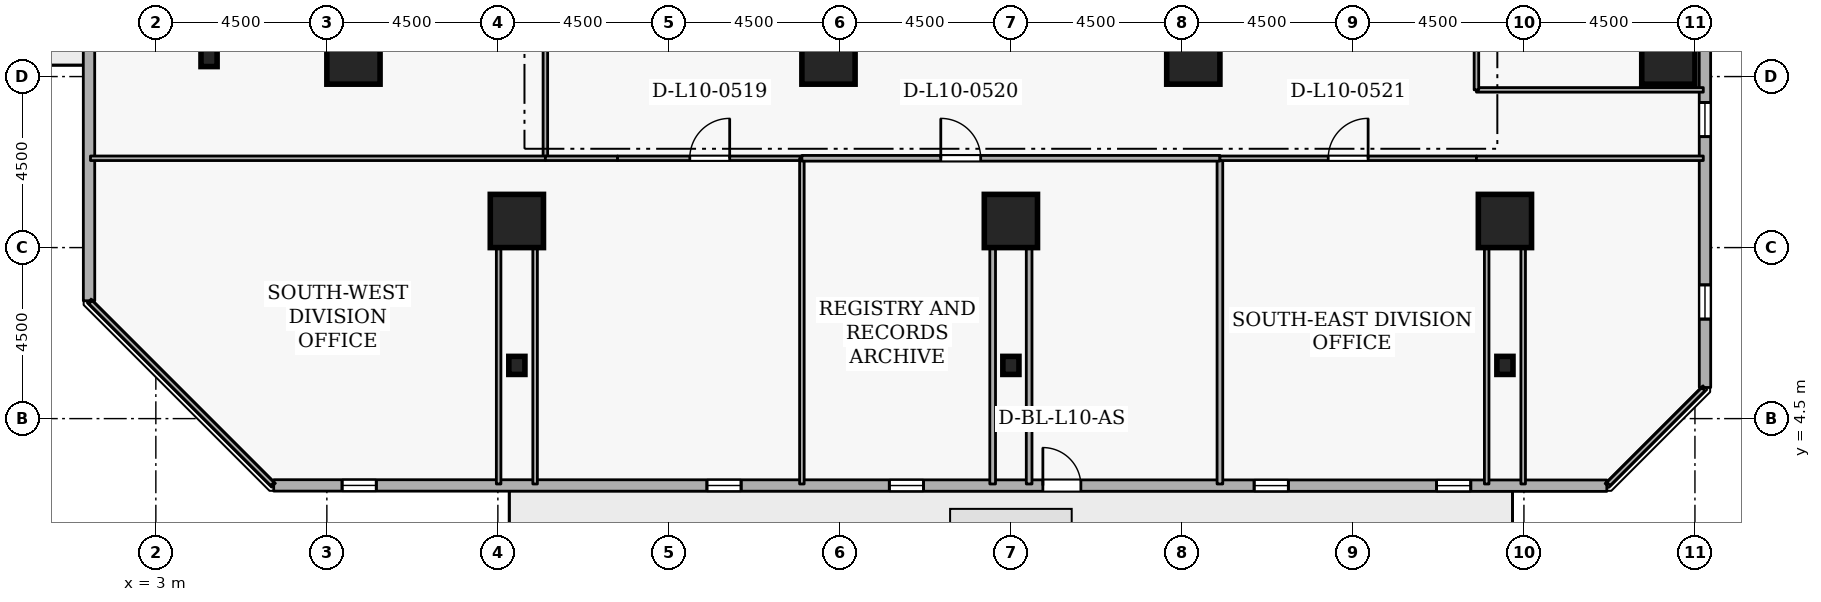
"""IFC4 building model, lengths in metres.
Left out: names, types, materials, properties, quantities, classifications, styles, units other than length and angle.
Written with IfcOpenShell. Run it as: python <this file> out.ifc"""

import sys

from ifc_helpers import new_model, si_unit, direction, frame, frame_2d, origin, origin_2d, place, context, subcontext, project, spatial, rectangle, i_section, extrude, element, fill, save


model = new_model("IFC4")
c1 = context("Model", 3, precision=1e-05, world=origin(), true_north=direction((0.0, 1.0)))
c2 = subcontext(c1, "Body", "Model", "MODEL_VIEW")
j1 = project(units=[si_unit("LENGTHUNIT", "METRE"), si_unit("PLANEANGLEUNIT", "RADIAN")], contexts=[c1])
p1 = place(None, origin())
s1 = spatial("IfcSite", under=j1, at=p1, CompositionType="ELEMENT")
p2 = place(p1, origin())
s2 = spatial("IfcBuilding", under=s1, at=p2, CompositionType="ELEMENT")
p3 = place(p2, frame((0.0, 0.0, 42.3)))
s3 = spatial("IfcBuildingStorey", under=s2, at=p3, CompositionType="ELEMENT", Elevation=42.3)
for number, where, z_axis, x_axis in (
    (1, (12.5, 9.7, 0.0), (0.0, 0.0, 1.0), (1.0, 0.0, 0.0)),
    (2, (25.5, 9.7, 0.0), (0.0, 0.0, 1.0), (1.0, 0.0, 0.0)),
    (3, (38.5, 9.7, 0.0), (0.0, 0.0, 1.0), (1.0, 0.0, 0.0)),
    (4, (42.8, 14.0, 0.0), (0.0, 0.0, 1.0), (1.0, 0.0, 0.0)),
    (5, (8.2, 14.0, 0.0), (0.0, 0.0, 1.0), (1.0, 0.0, 0.0)),
    (6, (20.7, 14.0, 0.0), (0.0, 0.0, 1.0), (1.0, 0.0, 0.0)),
    (7, (30.3, 14.0, 0.0), (0.0, 0.0, 1.0), (1.0, 0.0, 0.0)),
):
    element("IfcColumn", number, at=place(p3, frame(where, z_axis=z_axis, x_axis=x_axis)), inside=s3, PredefinedType="COLUMN", context=c2, shape_type="SweptSolid", body=[
        extrude(rectangle(XDim=1.4, YDim=1.4, at=origin_2d()), origin(), (0.0, 0.0, 1.0), 3.6),
    ])
for number, where, z_axis, x_axis in (
    (8, (12.5, 5.9, 0.0), (0.0, 0.0, 1.0), (1.0, 0.0, 0.0)),
    (9, (25.5, 5.9, 0.0), (0.0, 0.0, 1.0), (1.0, 0.0, 0.0)),
    (10, (38.5, 5.9, 0.0), (0.0, 0.0, 1.0), (1.0, 0.0, 0.0)),
    (11, (4.4, 14.0, 0.0), (0.0, 0.0, 1.0), (1.0, 0.0, 0.0)),
):
    element("IfcColumn", number, at=place(p3, frame(where, z_axis=z_axis, x_axis=x_axis)), inside=s3, PredefinedType="COLUMN", context=c2, shape_type="SweptSolid", body=[
        extrude(i_section(OverallWidth=0.424, OverallDepth=0.475, WebThickness=0.048, FlangeThickness=0.077, FilletRadius=0.015, at=origin_2d()), origin(), (0.0, 0.0, 1.0), 3.6),
    ])
p4 = place(p3, frame((6.101, 2.742, 0.0), z_axis=(0.0, 0.0, 1.0), x_axis=(0.999999978205, -0.000208784245, 0.0)))
e12 = element("IfcWall", 12, at=p4, inside=s3, PredefinedType="STANDARD", context=c2, shape_type="SweptSolid", body=[
    extrude(rectangle(XDim=35.08, YDim=0.3, at=frame_2d((17.54, 0.0))), origin(), (0.0, 0.0, 1.0), 2.7),
])
p5 = place(p4, frame((20.24, 0.0, 0.0)))
e13 = element("IfcOpeningElement", 13, at=p5, cuts=e12, PredefinedType="OPENING", context=c2, shape_type="SweptSolid", body=[
    extrude(rectangle(XDim=1.0, YDim=2.08, at=frame_2d((0.5, 1.04))), frame((0.0, 0.16, 0.0), z_axis=(0.0, -1.0, 0.0), x_axis=(1.0, 0.0, 0.0)), (0.0, 0.0, 1.0), 0.32),
])
p6 = place(p4, frame((1.8, 0.0, 0.72)))
e14 = element("IfcOpeningElement", 14, at=p6, cuts=e12, PredefinedType="OPENING", context=c2, shape_type="SweptSolid", body=[
    extrude(rectangle(XDim=0.9, YDim=1.75, at=frame_2d((0.45, 0.875))), frame((0.0, 0.16, 0.0), z_axis=(0.0, -1.0, 0.0), x_axis=(1.0, 0.0, 0.0)), (0.0, 0.0, 1.0), 0.32),
])
p7 = place(p4, frame((11.4, 0.0, 0.72)))
e15 = element("IfcOpeningElement", 15, at=p7, cuts=e12, PredefinedType="OPENING", context=c2, shape_type="SweptSolid", body=[
    extrude(rectangle(XDim=0.9, YDim=1.75, at=frame_2d((0.45, 0.875))), frame((0.0, 0.16, 0.0), z_axis=(0.0, -1.0, 0.0), x_axis=(1.0, 0.0, 0.0)), (0.0, 0.0, 1.0), 0.32),
])
p8 = place(p4, frame((16.2, 0.0, 0.72)))
e16 = element("IfcOpeningElement", 16, at=p8, cuts=e12, PredefinedType="OPENING", context=c2, shape_type="SweptSolid", body=[
    extrude(rectangle(XDim=0.9, YDim=1.75, at=frame_2d((0.45, 0.875))), frame((0.0, 0.16, 0.0), z_axis=(0.0, -1.0, 0.0), x_axis=(1.0, 0.0, 0.0)), (0.0, 0.0, 1.0), 0.32),
])
p9 = place(p4, frame((25.8, 0.0, 0.72)))
e17 = element("IfcOpeningElement", 17, at=p9, cuts=e12, PredefinedType="OPENING", context=c2, shape_type="SweptSolid", body=[
    extrude(rectangle(XDim=0.9, YDim=1.75, at=frame_2d((0.45, 0.875))), frame((0.0, 0.16, 0.0), z_axis=(0.0, -1.0, 0.0), x_axis=(1.0, 0.0, 0.0)), (0.0, 0.0, 1.0), 0.32),
])
p10 = place(p4, frame((30.6, 0.0, 0.72)))
e18 = element("IfcOpeningElement", 18, at=p10, cuts=e12, PredefinedType="OPENING", context=c2, shape_type="SweptSolid", body=[
    extrude(rectangle(XDim=0.9, YDim=1.75, at=frame_2d((0.45, 0.875))), frame((0.0, 0.16, 0.0), z_axis=(0.0, -1.0, 0.0), x_axis=(1.0, 0.0, 0.0)), (0.0, 0.0, 1.0), 0.32),
])
p11 = place(p3, frame((43.765, 5.319, 0.0), z_axis=(0.0, 0.0, 1.0), x_axis=(-0.000208784245, 0.999999978205, 0.0)))
e19 = element("IfcWall", 19, at=p11, inside=s3, PredefinedType="STANDARD", context=c2, shape_type="SweptSolid", body=[
    extrude(rectangle(XDim=35.08, YDim=0.3, at=frame_2d((17.54, 0.0))), origin(), (0.0, 0.0, 1.0), 2.7),
])
p12 = place(p11, frame((1.8, 0.0, 0.72)))
e20 = element("IfcOpeningElement", 20, at=p12, cuts=e19, PredefinedType="OPENING", context=c2, shape_type="SweptSolid", body=[
    extrude(rectangle(XDim=0.9, YDim=1.75, at=frame_2d((0.45, 0.875))), frame((0.0, 0.16, 0.0), z_axis=(0.0, -1.0, 0.0), x_axis=(1.0, 0.0, 0.0)), (0.0, 0.0, 1.0), 0.32),
])
p13 = place(p11, frame((6.6, 0.0, 0.72)))
e21 = element("IfcOpeningElement", 21, at=p13, cuts=e19, PredefinedType="OPENING", context=c2, shape_type="SweptSolid", body=[
    extrude(rectangle(XDim=0.9, YDim=1.75, at=frame_2d((0.45, 0.875))), frame((0.0, 0.16, 0.0), z_axis=(0.0, -1.0, 0.0), x_axis=(1.0, 0.0, 0.0)), (0.0, 0.0, 1.0), 0.32),
])
p14 = place(p11, frame((11.4, 0.0, 0.72)))
e22 = element("IfcOpeningElement", 22, at=p14, cuts=e19, PredefinedType="OPENING", context=c2, shape_type="SweptSolid", body=[
    extrude(rectangle(XDim=0.9, YDim=1.75, at=frame_2d((0.45, 0.875))), frame((0.0, 0.16, 0.0), z_axis=(0.0, -1.0, 0.0), x_axis=(1.0, 0.0, 0.0)), (0.0, 0.0, 1.0), 0.32),
])
p15 = place(p11, frame((16.2, 0.0, 0.72)))
e23 = element("IfcOpeningElement", 23, at=p15, cuts=e19, PredefinedType="OPENING", context=c2, shape_type="SweptSolid", body=[
    extrude(rectangle(XDim=0.9, YDim=1.75, at=frame_2d((0.45, 0.875))), frame((0.0, 0.16, 0.0), z_axis=(0.0, -1.0, 0.0), x_axis=(1.0, 0.0, 0.0)), (0.0, 0.0, 1.0), 0.32),
])
p16 = place(p11, frame((25.8, 0.0, 0.72)))
e24 = element("IfcOpeningElement", 24, at=p16, cuts=e19, PredefinedType="OPENING", context=c2, shape_type="SweptSolid", body=[
    extrude(rectangle(XDim=0.9, YDim=1.75, at=frame_2d((0.45, 0.875))), frame((0.0, 0.16, 0.0), z_axis=(0.0, -1.0, 0.0), x_axis=(1.0, 0.0, 0.0)), (0.0, 0.0, 1.0), 0.32),
])
p17 = place(p11, frame((30.6, 0.0, 0.72)))
e25 = element("IfcOpeningElement", 25, at=p17, cuts=e19, PredefinedType="OPENING", context=c2, shape_type="SweptSolid", body=[
    extrude(rectangle(XDim=0.9, YDim=1.75, at=frame_2d((0.45, 0.875))), frame((0.0, 0.16, 0.0), z_axis=(0.0, -1.0, 0.0), x_axis=(1.0, 0.0, 0.0)), (0.0, 0.0, 1.0), 0.32),
])
p18 = place(p3, frame((1.235, 42.681, 0.0), z_axis=(0.0, 0.0, 1.0), x_axis=(0.000208784245, -0.999999978205, 0.0)))
e26 = element("IfcWall", 26, at=p18, inside=s3, PredefinedType="STANDARD", context=c2, shape_type="SweptSolid", body=[
    extrude(rectangle(XDim=35.08, YDim=0.3, at=frame_2d((17.54, 0.0))), origin(), (0.0, 0.0, 1.0), 2.7),
])
p19 = place(p18, frame((19.34, 0.0, 0.0)))
e27 = element("IfcOpeningElement", 27, at=p19, cuts=e26, PredefinedType="OPENING", context=c2, shape_type="SweptSolid", body=[
    extrude(rectangle(XDim=1.0, YDim=2.08, at=frame_2d((0.5, 1.04))), frame((0.0, 0.16, 0.0), z_axis=(0.0, -1.0, 0.0), x_axis=(1.0, 0.0, 0.0)), (0.0, 0.0, 1.0), 0.32),
])
p20 = place(p18, frame((1.8, 0.0, 0.72)))
e28 = element("IfcOpeningElement", 28, at=p20, cuts=e26, PredefinedType="OPENING", context=c2, shape_type="SweptSolid", body=[
    extrude(rectangle(XDim=0.9, YDim=1.75, at=frame_2d((0.45, 0.875))), frame((0.0, 0.16, 0.0), z_axis=(0.0, -1.0, 0.0), x_axis=(1.0, 0.0, 0.0)), (0.0, 0.0, 1.0), 0.32),
])
p21 = place(p18, frame((6.6, 0.0, 0.72)))
e29 = element("IfcOpeningElement", 29, at=p21, cuts=e26, PredefinedType="OPENING", context=c2, shape_type="SweptSolid", body=[
    extrude(rectangle(XDim=0.9, YDim=1.75, at=frame_2d((0.45, 0.875))), frame((0.0, 0.16, 0.0), z_axis=(0.0, -1.0, 0.0), x_axis=(1.0, 0.0, 0.0)), (0.0, 0.0, 1.0), 0.32),
])
p22 = place(p18, frame((11.4, 0.0, 0.72)))
e30 = element("IfcOpeningElement", 30, at=p22, cuts=e26, PredefinedType="OPENING", context=c2, shape_type="SweptSolid", body=[
    extrude(rectangle(XDim=0.9, YDim=1.75, at=frame_2d((0.45, 0.875))), frame((0.0, 0.16, 0.0), z_axis=(0.0, -1.0, 0.0), x_axis=(1.0, 0.0, 0.0)), (0.0, 0.0, 1.0), 0.32),
])
p23 = place(p18, frame((16.2, 0.0, 0.72)))
e31 = element("IfcOpeningElement", 31, at=p23, cuts=e26, PredefinedType="OPENING", context=c2, shape_type="SweptSolid", body=[
    extrude(rectangle(XDim=0.9, YDim=1.75, at=frame_2d((0.45, 0.875))), frame((0.0, 0.16, 0.0), z_axis=(0.0, -1.0, 0.0), x_axis=(1.0, 0.0, 0.0)), (0.0, 0.0, 1.0), 0.32),
])
p24 = place(p18, frame((25.8, 0.0, 0.72)))
e32 = element("IfcOpeningElement", 32, at=p24, cuts=e26, PredefinedType="OPENING", context=c2, shape_type="SweptSolid", body=[
    extrude(rectangle(XDim=0.9, YDim=1.75, at=frame_2d((0.45, 0.875))), frame((0.0, 0.16, 0.0), z_axis=(0.0, -1.0, 0.0), x_axis=(1.0, 0.0, 0.0)), (0.0, 0.0, 1.0), 0.32),
])
p25 = place(p3, frame((13.25, 20.7, 0.0), z_axis=(0.0, 0.0, 1.0), x_axis=(0.0, -1.0, 0.0)))
e33 = element("IfcWall", 33, at=p25, inside=s3, PredefinedType="PARTITIONING", context=c2, shape_type="SweptSolid", body=[
    extrude(rectangle(XDim=9.35, YDim=0.12, at=frame_2d((4.675, 0.0))), origin(), (0.0, 0.0, 1.0), 3.34),
])
p26 = place(p25, frame((4.15, 0.0, 0.0)))
e34 = element("IfcOpeningElement", 34, at=p26, cuts=e33, PredefinedType="OPENING", context=c2, shape_type="SweptSolid", body=[
    extrude(rectangle(XDim=1.05, YDim=2.1, at=frame_2d((0.525, 1.05))), frame((0.0, 0.07, 0.0), z_axis=(0.0, -1.0, 0.0), x_axis=(1.0, 0.0, 0.0)), (0.0, 0.0, 1.0), 0.14),
])
p27 = place(p3, frame((13.25, 11.35, 0.0), z_axis=(0.0, 0.0, 1.0), x_axis=(-1.0, 0.0, 0.0)))
e35 = element("IfcWall", 35, at=p27, inside=s3, PredefinedType="PARTITIONING", context=c2, shape_type="SweptSolid", body=[
    extrude(rectangle(XDim=11.97, YDim=0.12, at=frame_2d((5.985, 0.0))), origin(), (0.0, 0.0, 1.0), 3.34),
])
p28 = place(p3, frame((43.72, 13.15, 0.0), z_axis=(0.0, 0.0, 1.0), x_axis=(-1.0, 0.0, 0.0)))
e36 = element("IfcWall", 36, at=p28, inside=s3, PredefinedType="PARTITIONING", context=c2, shape_type="SweptSolid", body=[
    extrude(rectangle(XDim=5.97, YDim=0.12, at=frame_2d((2.985, 0.0))), origin(), (0.0, 0.0, 1.0), 3.34),
])
p29 = place(p3, frame((37.75, 13.15, 0.0), z_axis=(0.0, 0.0, 1.0), x_axis=(0.0, 1.0, 0.0)))
e37 = element("IfcWall", 37, at=p29, inside=s3, PredefinedType="PARTITIONING", context=c2, shape_type="SweptSolid", body=[
    extrude(rectangle(XDim=1.862, YDim=0.12, at=frame_2d((0.931, 0.0))), origin(), (0.0, 0.0, 1.0), 3.34),
])
p30 = place(p3, frame((12.98, 2.78, 0.0), z_axis=(0.0, 0.0, 1.0), x_axis=(0.0, 1.0, 0.0)))
e38 = element("IfcWall", 38, at=p30, inside=s3, PredefinedType="PARTITIONING", context=c2, shape_type="SweptSolid", body=[
    extrude(rectangle(XDim=6.92, YDim=0.12, at=frame_2d((3.46, 0.0))), origin(), (0.0, 0.0, 1.0), 3.34),
])
p31 = place(p3, frame((12.02, 9.7, 0.0), z_axis=(0.0, 0.0, 1.0), x_axis=(0.0, -1.0, 0.0)))
e39 = element("IfcWall", 39, at=p31, inside=s3, PredefinedType="PARTITIONING", context=c2, shape_type="SweptSolid", body=[
    extrude(rectangle(XDim=6.92, YDim=0.12, at=frame_2d((3.46, 0.0))), origin(), (0.0, 0.0, 1.0), 2.895),
])
p32 = place(p3, frame((6.066, 2.78, 0.0), z_axis=(0.0, 0.0, 1.0), x_axis=(-0.707106781187, 0.707106781187, 0.0)))
e40 = element("IfcWall", 40, at=p32, inside=s3, PredefinedType="PARTITIONING", context=c2, shape_type="SweptSolid", body=[
    extrude(rectangle(XDim=6.768, YDim=0.12, at=frame_2d((3.384, 0.0))), origin(), (0.0, 0.0, 1.0), 3.34),
])
p33 = place(p3, frame((13.25, 11.35, 0.0), z_axis=(0.0, 0.0, 1.0), x_axis=(1.0, 0.0, 0.0)))
e41 = element("IfcWall", 41, at=p33, inside=s3, PredefinedType="PARTITIONING", context=c2, shape_type="SweptSolid", body=[
    extrude(rectangle(XDim=1.9, YDim=0.12, at=frame_2d((0.95, 0.0))), origin(), (0.0, 0.0, 1.0), 3.34),
])
p34 = place(p3, frame((15.15, 11.35, 0.0), z_axis=(0.0, 0.0, 1.0), x_axis=(1.0, 0.0, 0.0)))
e42 = element("IfcWall", 42, at=p34, inside=s3, PredefinedType="PARTITIONING", context=c2, shape_type="SweptSolid", body=[
    extrude(rectangle(XDim=4.85, YDim=0.12, at=frame_2d((2.425, 0.0))), origin(), (0.0, 0.0, 1.0), 3.34),
])
p35 = place(p34, frame((1.9, 0.0, 0.0)))
e43 = element("IfcOpeningElement", 43, at=p35, cuts=e42, PredefinedType="OPENING", context=c2, shape_type="SweptSolid", body=[
    extrude(rectangle(XDim=1.05, YDim=2.1, at=frame_2d((0.525, 1.05))), frame((0.0, 0.07, 0.0), z_axis=(0.0, -1.0, 0.0), x_axis=(1.0, 0.0, 0.0)), (0.0, 0.0, 1.0), 0.14),
])
p36 = place(p3, frame((20.0, 11.35, 0.0), z_axis=(0.0, 0.0, 1.0), x_axis=(0.0, -1.0, 0.0)))
e44 = element("IfcWall", 44, at=p36, inside=s3, PredefinedType="PARTITIONING", context=c2, shape_type="SweptSolid", body=[
    extrude(rectangle(XDim=8.57, YDim=0.12, at=frame_2d((4.285, 0.0))), origin(), (0.0, 0.0, 1.0), 3.34),
])
p37 = place(p3, frame((31.0, 11.35, 0.0), z_axis=(0.0, 0.0, 1.0), x_axis=(0.0, -1.0, 0.0)))
e45 = element("IfcWall", 45, at=p37, inside=s3, PredefinedType="PARTITIONING", context=c2, shape_type="SweptSolid", body=[
    extrude(rectangle(XDim=8.57, YDim=0.15, at=frame_2d((4.285, 0.0))), origin(), (0.0, 0.0, 1.0), 3.34),
])
for number, where, z_axis, x_axis in (
    (46, (25.98, 2.78, 0.0), (0.0, 0.0, 1.0), (0.0, 1.0, 0.0)),
    (47, (25.02, 9.7, 0.0), (0.0, 0.0, 1.0), (0.0, -1.0, 0.0)),
):
    element("IfcWall", number, at=place(p3, frame(where, z_axis=z_axis, x_axis=x_axis)), inside=s3, PredefinedType="PARTITIONING", context=c2, shape_type="SweptSolid", body=[
        extrude(rectangle(XDim=6.92, YDim=0.15, at=frame_2d((3.46, 0.0))), origin(), (0.0, 0.0, 1.0), 3.34),
    ])
p38 = place(p3, frame((20.0, 11.35, 0.0), z_axis=(0.0, 0.0, 1.0), x_axis=(1.0, 0.0, 0.0)))
e48 = element("IfcWall", 48, at=p38, inside=s3, PredefinedType="PARTITIONING", context=c2, shape_type="SweptSolid", body=[
    extrude(rectangle(XDim=11.0, YDim=0.15, at=frame_2d((5.5, 0.0))), origin(), (0.0, 0.0, 1.0), 3.34),
])
p39 = place(p38, frame((3.655, 0.0, 0.0)))
e49 = element("IfcOpeningElement", 49, at=p39, cuts=e48, PredefinedType="OPENING", context=c2, shape_type="SweptSolid", body=[
    extrude(rectangle(XDim=1.05, YDim=2.1, at=frame_2d((0.525, 1.05))), frame((0.0, 0.085, 0.0), z_axis=(0.0, -1.0, 0.0), x_axis=(1.0, 0.0, 0.0)), (0.0, 0.0, 1.0), 0.17),
])
for number, where, z_axis, x_axis in (
    (50, (38.98, 2.78, 0.0), (0.0, 0.0, 1.0), (0.0, 1.0, 0.0)),
    (51, (38.02, 9.7, 0.0), (0.0, 0.0, 1.0), (0.0, -1.0, 0.0)),
):
    element("IfcWall", number, at=place(p3, frame(where, z_axis=z_axis, x_axis=x_axis)), inside=s3, PredefinedType="PARTITIONING", context=c2, shape_type="SweptSolid", body=[
        extrude(rectangle(XDim=6.92, YDim=0.12, at=frame_2d((3.46, 0.0))), origin(), (0.0, 0.0, 1.0), 3.34),
    ])
p40 = place(p3, frame((31.0, 11.35, 0.0), z_axis=(0.0, 0.0, 1.0), x_axis=(1.0, 0.0, 0.0)))
e52 = element("IfcWall", 52, at=p40, inside=s3, PredefinedType="PARTITIONING", context=c2, shape_type="SweptSolid", body=[
    extrude(rectangle(XDim=6.75, YDim=0.12, at=frame_2d((3.375, 0.0))), origin(), (0.0, 0.0, 1.0), 3.34),
])
p41 = place(p40, frame((2.85, 0.0, 0.0)))
e53 = element("IfcOpeningElement", 53, at=p41, cuts=e52, PredefinedType="OPENING", context=c2, shape_type="SweptSolid", body=[
    extrude(rectangle(XDim=1.05, YDim=2.1, at=frame_2d((0.525, 1.05))), frame((0.0, 0.07, 0.0), z_axis=(0.0, -1.0, 0.0), x_axis=(1.0, 0.0, 0.0)), (0.0, 0.0, 1.0), 0.14),
])
p42 = place(p3, frame((37.75, 11.35, 0.0), z_axis=(0.0, 0.0, 1.0), x_axis=(1.0, 0.0, 0.0)))
e54 = element("IfcWall", 54, at=p42, inside=s3, PredefinedType="PARTITIONING", context=c2, shape_type="SweptSolid", body=[
    extrude(rectangle(XDim=5.97, YDim=0.12, at=frame_2d((2.985, 0.0))), origin(), (0.0, 0.0, 1.0), 3.34),
])
p43 = place(p3, frame((43.72, 5.275, 0.0), z_axis=(0.0, 0.0, 1.0), x_axis=(-0.707106781187, -0.707106781187, 0.0)))
e55 = element("IfcWall", 55, at=p43, inside=s3, PredefinedType="PARTITIONING", context=c2, shape_type="SweptSolid", body=[
    extrude(rectangle(XDim=3.528, YDim=0.12, at=frame_2d((1.764, 0.0))), origin(), (0.0, 0.0, 1.0), 3.34),
])
p44 = place(p5, origin())
e56 = element("IfcDoor", 56, at=p44, inside=s3, OperationType="SINGLE_SWING_LEFT", PredefinedType="DOOR", context=c2, shape_type="SweptSolid", body=[
    extrude(rectangle(XDim=1.0, YDim=2.08, at=frame_2d((0.5, 1.04))), frame((0.0, 0.025, 0.0), z_axis=(0.0, -1.0, 0.0), x_axis=(1.0, 0.0, 0.0)), (0.0, 0.0, 1.0), 0.05),
])
fill(e13, e56)
p45 = place(p6, origin())
e57 = element("IfcWindow", 57, at=p45, inside=s3, PartitioningType="SINGLE_PANEL", PredefinedType="WINDOW", context=c2, shape_type="SweptSolid", body=[
    extrude(rectangle(XDim=0.9, YDim=1.75, at=frame_2d((0.45, 0.875))), frame((0.0, 0.03, 0.0), z_axis=(0.0, -1.0, 0.0), x_axis=(1.0, 0.0, 0.0)), (0.0, 0.0, 1.0), 0.06),
])
fill(e14, e57)
p46 = place(p7, origin())
e58 = element("IfcWindow", 58, at=p46, inside=s3, PartitioningType="SINGLE_PANEL", PredefinedType="WINDOW", context=c2, shape_type="SweptSolid", body=[
    extrude(rectangle(XDim=0.9, YDim=1.75, at=frame_2d((0.45, 0.875))), frame((0.0, 0.03, 0.0), z_axis=(0.0, -1.0, 0.0), x_axis=(1.0, 0.0, 0.0)), (0.0, 0.0, 1.0), 0.06),
])
fill(e15, e58)
p47 = place(p8, origin())
e59 = element("IfcWindow", 59, at=p47, inside=s3, PartitioningType="SINGLE_PANEL", PredefinedType="WINDOW", context=c2, shape_type="SweptSolid", body=[
    extrude(rectangle(XDim=0.9, YDim=1.75, at=frame_2d((0.45, 0.875))), frame((0.0, 0.03, 0.0), z_axis=(0.0, -1.0, 0.0), x_axis=(1.0, 0.0, 0.0)), (0.0, 0.0, 1.0), 0.06),
])
fill(e16, e59)
p48 = place(p9, origin())
e60 = element("IfcWindow", 60, at=p48, inside=s3, PartitioningType="SINGLE_PANEL", PredefinedType="WINDOW", context=c2, shape_type="SweptSolid", body=[
    extrude(rectangle(XDim=0.9, YDim=1.75, at=frame_2d((0.45, 0.875))), frame((0.0, 0.03, 0.0), z_axis=(0.0, -1.0, 0.0), x_axis=(1.0, 0.0, 0.0)), (0.0, 0.0, 1.0), 0.06),
])
fill(e17, e60)
p49 = place(p10, origin())
e61 = element("IfcWindow", 61, at=p49, inside=s3, PartitioningType="SINGLE_PANEL", PredefinedType="WINDOW", context=c2, shape_type="SweptSolid", body=[
    extrude(rectangle(XDim=0.9, YDim=1.75, at=frame_2d((0.45, 0.875))), frame((0.0, 0.03, 0.0), z_axis=(0.0, -1.0, 0.0), x_axis=(1.0, 0.0, 0.0)), (0.0, 0.0, 1.0), 0.06),
])
fill(e18, e61)
p50 = place(p12, origin())
e62 = element("IfcWindow", 62, at=p50, inside=s3, PartitioningType="SINGLE_PANEL", PredefinedType="WINDOW", context=c2, shape_type="SweptSolid", body=[
    extrude(rectangle(XDim=0.9, YDim=1.75, at=frame_2d((0.45, 0.875))), frame((0.0, 0.03, 0.0), z_axis=(0.0, -1.0, 0.0), x_axis=(1.0, 0.0, 0.0)), (0.0, 0.0, 1.0), 0.06),
])
fill(e20, e62)
p51 = place(p13, origin())
e63 = element("IfcWindow", 63, at=p51, inside=s3, PartitioningType="SINGLE_PANEL", PredefinedType="WINDOW", context=c2, shape_type="SweptSolid", body=[
    extrude(rectangle(XDim=0.9, YDim=1.75, at=frame_2d((0.45, 0.875))), frame((0.0, 0.03, 0.0), z_axis=(0.0, -1.0, 0.0), x_axis=(1.0, 0.0, 0.0)), (0.0, 0.0, 1.0), 0.06),
])
fill(e21, e63)
p52 = place(p35, origin())
e64 = element("IfcDoor", 64, at=p52, inside=s3, OperationType="SINGLE_SWING_RIGHT", PredefinedType="DOOR", context=c2, shape_type="SweptSolid", body=[
    extrude(rectangle(XDim=1.05, YDim=2.1, at=frame_2d((0.525, 1.05))), frame((0.0, 0.025, 0.0), z_axis=(0.0, -1.0, 0.0), x_axis=(1.0, 0.0, 0.0)), (0.0, 0.0, 1.0), 0.05),
])
fill(e43, e64)
p53 = place(p39, origin())
e65 = element("IfcDoor", 65, at=p53, inside=s3, OperationType="SINGLE_SWING_LEFT", PredefinedType="DOOR", context=c2, shape_type="SweptSolid", body=[
    extrude(rectangle(XDim=1.05, YDim=2.1, at=frame_2d((0.525, 1.05))), frame((0.0, 0.025, 0.0), z_axis=(0.0, -1.0, 0.0), x_axis=(1.0, 0.0, 0.0)), (0.0, 0.0, 1.0), 0.05),
])
fill(e49, e65)
p54 = place(p41, origin())
e66 = element("IfcDoor", 66, at=p54, inside=s3, OperationType="SINGLE_SWING_RIGHT", PredefinedType="DOOR", context=c2, shape_type="SweptSolid", body=[
    extrude(rectangle(XDim=1.05, YDim=2.1, at=frame_2d((0.525, 1.05))), frame((0.0, 0.025, 0.0), z_axis=(0.0, -1.0, 0.0), x_axis=(1.0, 0.0, 0.0)), (0.0, 0.0, 1.0), 0.05),
])
fill(e53, e66)
save(model, sys.argv[1])
